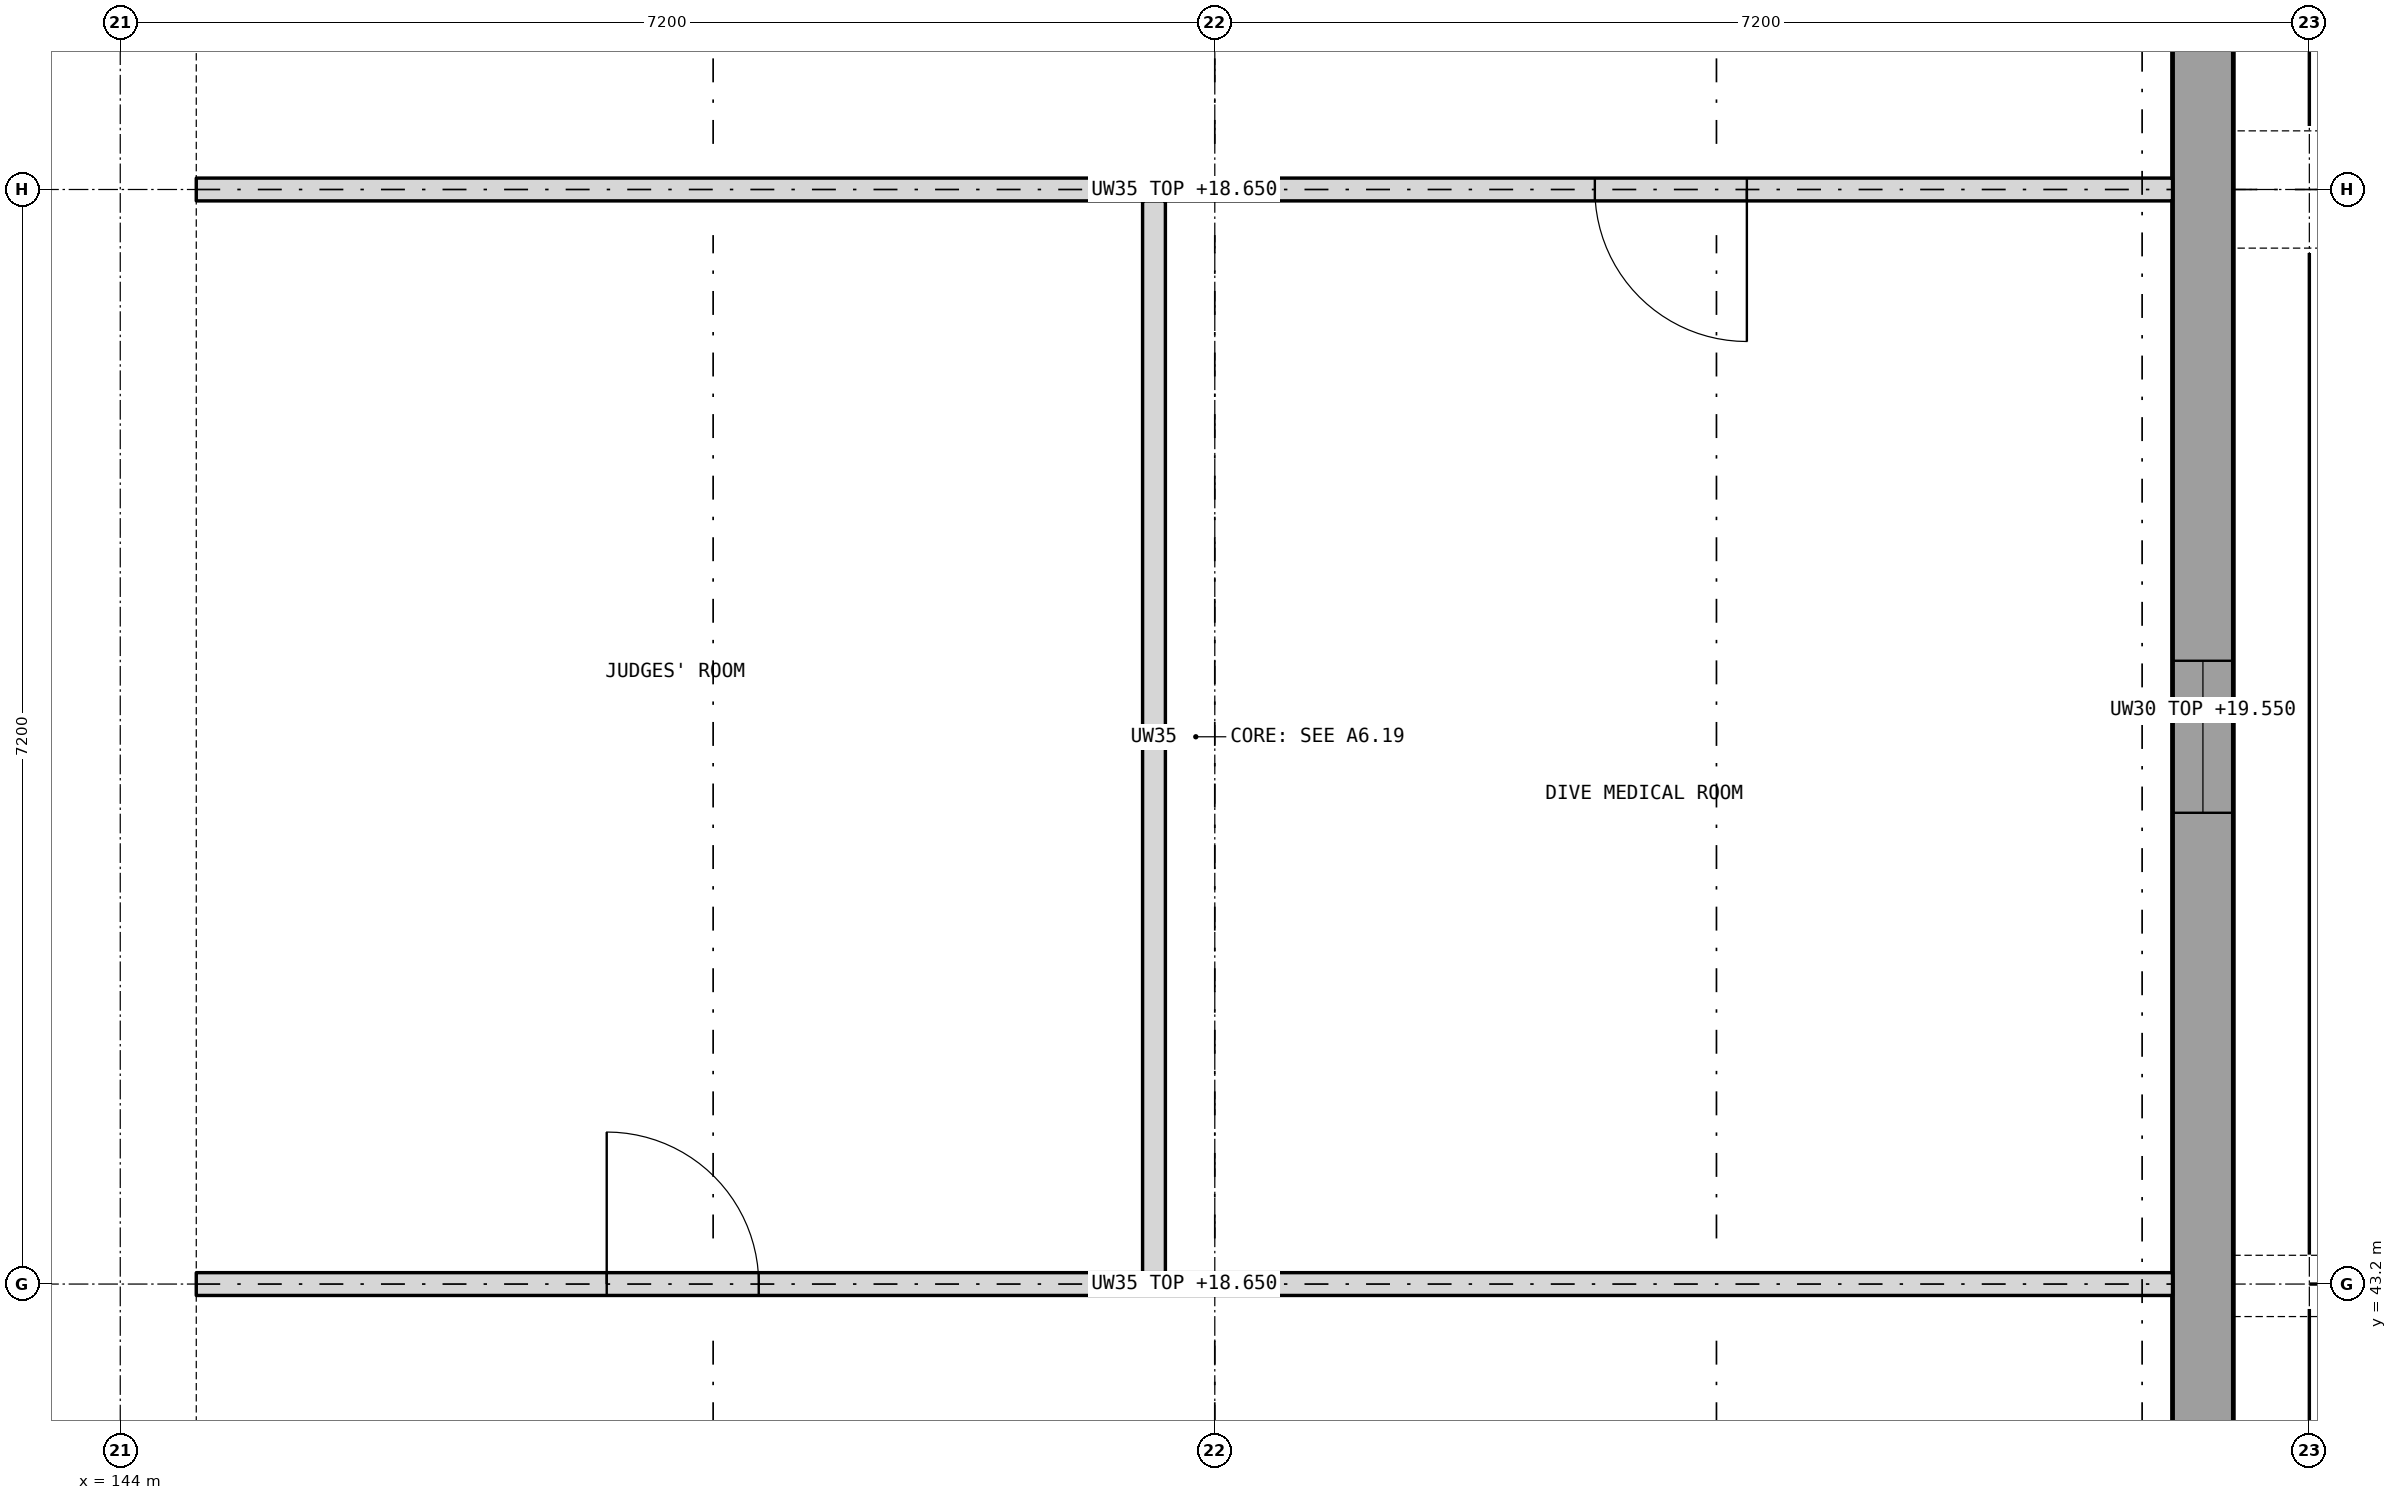
"""IFC4 building model, lengths in metres.
Left out: names, types, materials, properties, quantities, classifications, styles, units other than length and angle.
Written with IfcOpenShell. Run it as: python <this file> out.ifc"""

import sys

from ifc_helpers import new_model, si_unit, direction, frame, frame_2d, origin, place, context, subcontext, project, spatial, rectangle, extrude, element, fill, save


model = new_model("IFC4")
c1 = context("Model", 3, precision=1e-05, world=origin(), true_north=direction((0.0, 1.0)))
c2 = subcontext(c1, "Body", "Model", "MODEL_VIEW")
j1 = project(units=[si_unit("LENGTHUNIT", "METRE"), si_unit("PLANEANGLEUNIT", "RADIAN")], contexts=[c1])
p1 = place(None, origin())
s1 = spatial("IfcSite", under=j1, at=p1, CompositionType="ELEMENT")
p2 = place(p1, origin())
s2 = spatial("IfcBuilding", under=s1, at=p2, CompositionType="ELEMENT")
p3 = place(p2, frame((0.0, 0.0, 16.5)))
s3 = spatial("IfcBuildingStorey", under=s2, at=p3, CompositionType="ELEMENT", Elevation=16.5)
p4 = place(p3, frame((157.7, 36.0, 0.0), z_axis=(0.0, 0.0, 1.0), x_axis=(0.0, 1.0, 0.0)))
e1 = element("IfcWall", 1, at=p4, inside=s3, PredefinedType="SHEAR", context=c2, shape_type="SweptSolid", body=[
    extrude(rectangle(XDim=21.95, YDim=0.4, at=frame_2d((10.975, 0.0))), origin(), (0.0, 0.0, 1.0), 3.05),
])
p5 = place(p4, frame((10.3, 0.0, 0.9)))
e2 = element("IfcOpeningElement", 2, at=p5, cuts=e1, PredefinedType="OPENING", context=c2, shape_type="SweptSolid", body=[
    extrude(rectangle(XDim=1.0, YDim=1.5, at=frame_2d((0.5, 0.75))), frame((0.0, 0.21, 0.0), z_axis=(0.0, -1.0, 0.0), x_axis=(1.0, 0.0, 0.0)), (0.0, 0.0, 1.0), 0.42),
])
p6 = place(p3, frame((144.5, 43.2, 0.0), z_axis=(0.0, 0.0, 1.0), x_axis=(1.0, 0.0, 0.0)))
e3 = element("IfcWall", 3, at=p6, inside=s3, PredefinedType="PARTITIONING", context=c2, shape_type="SweptSolid", body=[
    extrude(rectangle(XDim=13.0, YDim=0.15, at=frame_2d((6.5, 0.0))), origin(), (0.0, 0.0, 1.0), 2.15),
])
p7 = place(p6, frame((2.7, 0.0, 0.0)))
e4 = element("IfcOpeningElement", 4, at=p7, cuts=e3, PredefinedType="OPENING", context=c2, shape_type="SweptSolid", body=[
    extrude(rectangle(XDim=1.0, YDim=2.1, at=frame_2d((0.5, 1.05))), frame((0.0, 0.085, 0.0), z_axis=(0.0, -1.0, 0.0), x_axis=(1.0, 0.0, 0.0)), (0.0, 0.0, 1.0), 0.17),
])
p8 = place(p3, frame((144.5, 50.4, 0.0), z_axis=(0.0, 0.0, 1.0), x_axis=(1.0, 0.0, 0.0)))
e5 = element("IfcWall", 5, at=p8, inside=s3, PredefinedType="PARTITIONING", context=c2, shape_type="SweptSolid", body=[
    extrude(rectangle(XDim=13.0, YDim=0.15, at=frame_2d((6.5, 0.0))), origin(), (0.0, 0.0, 1.0), 2.15),
])
p9 = place(p8, frame((9.2, 0.0, 0.0)))
e6 = element("IfcOpeningElement", 6, at=p9, cuts=e5, PredefinedType="OPENING", context=c2, shape_type="SweptSolid", body=[
    extrude(rectangle(XDim=1.0, YDim=2.1, at=frame_2d((0.5, 1.05))), frame((0.0, 0.085, 0.0), z_axis=(0.0, -1.0, 0.0), x_axis=(1.0, 0.0, 0.0)), (0.0, 0.0, 1.0), 0.17),
])
p10 = place(p3, frame((150.8, 43.275, 0.0), z_axis=(0.0, 0.0, 1.0), x_axis=(0.0, 1.0, 0.0)))
e7 = element("IfcWall", 7, at=p10, inside=s3, PredefinedType="PARTITIONING", context=c2, shape_type="SweptSolid", body=[
    extrude(rectangle(XDim=7.05, YDim=0.15, at=frame_2d((3.525, 0.0))), origin(), (0.0, 0.0, 1.0), 3.05),
])
p11 = place(p5, origin())
e8 = element("IfcWindow", 8, at=p11, inside=s3, PartitioningType="SINGLE_PANEL", PredefinedType="WINDOW", context=c2, shape_type="SweptSolid", body=[
    extrude(rectangle(XDim=1.0, YDim=1.5, at=frame_2d((0.5, 0.75))), frame((0.0, 0.03, 0.0), z_axis=(0.0, -1.0, 0.0), x_axis=(1.0, 0.0, 0.0)), (0.0, 0.0, 1.0), 0.06),
])
fill(e2, e8)
p12 = place(p7, origin())
e9 = element("IfcDoor", 9, at=p12, inside=s3, OperationType="SINGLE_SWING_LEFT", PredefinedType="DOOR", context=c2, shape_type="SweptSolid", body=[
    extrude(rectangle(XDim=1.0, YDim=2.1, at=frame_2d((0.5, 1.05))), frame((0.0, 0.025, 0.0), z_axis=(0.0, -1.0, 0.0), x_axis=(1.0, 0.0, 0.0)), (0.0, 0.0, 1.0), 0.05),
])
fill(e4, e9)
p13 = place(p9, frame((1.0, 0.0, 0.0), z_axis=(0.0, 0.0, 1.0), x_axis=(-1.0, 0.0, 0.0)))
e10 = element("IfcDoor", 10, at=p13, inside=s3, OperationType="SINGLE_SWING_LEFT", PredefinedType="DOOR", context=c2, shape_type="SweptSolid", body=[
    extrude(rectangle(XDim=1.0, YDim=2.1, at=frame_2d((0.5, 1.05))), frame((0.0, 0.025, 0.0), z_axis=(0.0, -1.0, 0.0), x_axis=(1.0, 0.0, 0.0)), (0.0, 0.0, 1.0), 0.05),
])
fill(e6, e10)
save(model, sys.argv[1])
